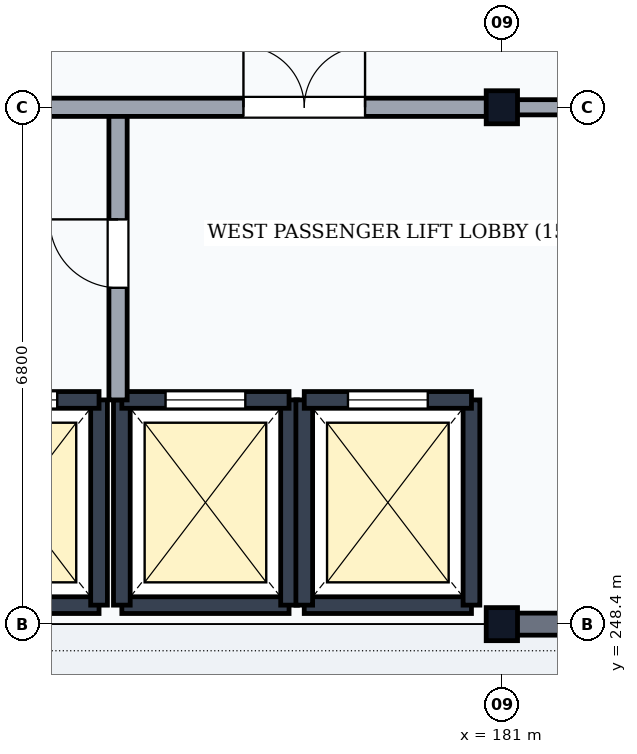
"""IFC4 building model, lengths in metres.
Left out: names, types, materials, properties, quantities, classifications, styles, units other than length and angle.
Written with IfcOpenShell. Run it as: python <this file> out.ifc"""

import sys

from ifc_helpers import new_model, si_unit, direction, frame, frame_2d, origin, origin_2d, place, context, subcontext, project, spatial, rectangle, i_section, extrude, element, fill, save


model = new_model("IFC4")
c1 = context("Model", 3, precision=1e-05, world=origin(), true_north=direction((0.0, 1.0)))
c2 = subcontext(c1, "Body", "Model", "MODEL_VIEW")
j1 = project(units=[si_unit("LENGTHUNIT", "METRE"), si_unit("PLANEANGLEUNIT", "RADIAN")], contexts=[c1])
p1 = place(None, origin())
s1 = spatial("IfcSite", under=j1, at=p1, CompositionType="ELEMENT")
p2 = place(p1, origin())
s2 = spatial("IfcBuilding", under=s1, at=p2, CompositionType="ELEMENT")
p3 = place(p2, frame((0.0, 0.0, 5.4)))
s3 = spatial("IfcBuildingStorey", under=s2, at=p3, CompositionType="ELEMENT", Elevation=5.4)
for number, where, z_axis, x_axis in (
    (1, (181.0, 248.4, 0.0), (0.0, 0.0, 1.0), (1.0, 0.0, 0.0)),
    (2, (181.0, 255.2, 0.0), (0.0, 0.0, 1.0), (1.0, 0.0, 0.0)),
):
    element("IfcColumn", number, at=place(p3, frame(where, z_axis=z_axis, x_axis=x_axis)), inside=s3, PredefinedType="COLUMN", context=c2, shape_type="SweptSolid", body=[
        extrude(i_section(OverallWidth=0.412, OverallDepth=0.435, WebThickness=0.036, FlangeThickness=0.057, FilletRadius=0.015, at=origin_2d()), origin(), (0.0, 0.0, 1.0), 5.1),
    ])
p4 = place(p3, frame((181.006, 248.4, 0.0), z_axis=(0.0, 0.0, 1.0), x_axis=(1.0, 0.0, 0.0)))
e3 = element("IfcWall", 3, at=p4, inside=s3, PredefinedType="SOLIDWALL", context=c2, shape_type="SweptSolid", body=[
    extrude(rectangle(XDim=7.988, YDim=0.29, at=frame_2d((3.994, 0.0))), origin(), (0.0, 0.0, 1.0), 4.548),
])
p5 = place(p4, frame((3.319, 0.0, 0.85)))
e4 = element("IfcOpeningElement", 4, at=p5, cuts=e3, PredefinedType="OPENING", context=c2, shape_type="SweptSolid", body=[
    extrude(rectangle(XDim=0.75, YDim=2.0, at=frame_2d((0.375, 1.0))), frame((0.0, 0.16, 0.0), z_axis=(0.0, -1.0, 0.0), x_axis=(1.0, 0.0, 0.0)), (0.0, 0.0, 1.0), 0.32),
])
p6 = place(p3, frame((173.5, 248.65, 0.0), z_axis=(0.0, 0.0, 1.0), x_axis=(1.0, 0.0, 0.0)))
e5 = element("IfcWall", 5, at=p6, inside=s3, PredefinedType="SHEAR", context=c2, shape_type="SweptSolid", body=[
    extrude(rectangle(XDim=2.2, YDim=0.22, at=frame_2d((1.1, 0.0))), origin(), (0.0, 0.0, 1.0), 4.86),
])
p7 = place(p3, frame((175.7, 248.65, 0.0), z_axis=(0.0, 0.0, 1.0), x_axis=(0.0, 1.0, 0.0)))
e6 = element("IfcWall", 6, at=p7, inside=s3, PredefinedType="SHEAR", context=c2, shape_type="SweptSolid", body=[
    extrude(rectangle(XDim=2.7, YDim=0.22, at=frame_2d((1.35, 0.0))), origin(), (0.0, 0.0, 1.0), 4.86),
])
p8 = place(p3, frame((173.5, 251.35, 0.0), z_axis=(0.0, 0.0, 1.0), x_axis=(1.0, 0.0, 0.0)))
e7 = element("IfcWall", 7, at=p8, inside=s3, PredefinedType="SHEAR", context=c2, shape_type="SweptSolid", body=[
    extrude(rectangle(XDim=2.2, YDim=0.22, at=frame_2d((1.1, 0.0))), origin(), (0.0, 0.0, 1.0), 4.86),
])
p9 = place(p8, frame((0.55, 0.0, 0.0)))
e8 = element("IfcOpeningElement", 8, at=p9, cuts=e7, PredefinedType="OPENING", context=c2, shape_type="SweptSolid", body=[
    extrude(rectangle(XDim=1.1, YDim=2.15, at=frame_2d((0.55, 1.075))), frame((0.0, 0.125, 0.0), z_axis=(0.0, -1.0, 0.0), x_axis=(1.0, 0.0, 0.0)), (0.0, 0.0, 1.0), 0.25),
])
p10 = place(p3, frame((176.0, 248.65, 0.0), z_axis=(0.0, 0.0, 1.0), x_axis=(1.0, 0.0, 0.0)))
e9 = element("IfcWall", 9, at=p10, inside=s3, PredefinedType="SHEAR", context=c2, shape_type="SweptSolid", body=[
    extrude(rectangle(XDim=2.2, YDim=0.22, at=frame_2d((1.1, 0.0))), origin(), (0.0, 0.0, 1.0), 4.86),
])
for number, where, z_axis, x_axis in (
    (10, (176.0, 248.65, 0.0), (0.0, 0.0, 1.0), (0.0, 1.0, 0.0)),
    (11, (178.2, 248.65, 0.0), (0.0, 0.0, 1.0), (0.0, 1.0, 0.0)),
):
    element("IfcWall", number, at=place(p3, frame(where, z_axis=z_axis, x_axis=x_axis)), inside=s3, PredefinedType="SHEAR", context=c2, shape_type="SweptSolid", body=[
        extrude(rectangle(XDim=2.7, YDim=0.22, at=frame_2d((1.35, 0.0))), origin(), (0.0, 0.0, 1.0), 4.86),
    ])
p11 = place(p3, frame((176.0, 251.35, 0.0), z_axis=(0.0, 0.0, 1.0), x_axis=(1.0, 0.0, 0.0)))
e12 = element("IfcWall", 12, at=p11, inside=s3, PredefinedType="SHEAR", context=c2, shape_type="SweptSolid", body=[
    extrude(rectangle(XDim=2.2, YDim=0.22, at=frame_2d((1.1, 0.0))), origin(), (0.0, 0.0, 1.0), 4.86),
])
p12 = place(p11, frame((0.575, 0.0, 0.0)))
e13 = element("IfcOpeningElement", 13, at=p12, cuts=e12, PredefinedType="OPENING", context=c2, shape_type="SweptSolid", body=[
    extrude(rectangle(XDim=1.05, YDim=2.15, at=frame_2d((0.525, 1.075))), frame((0.0, 0.125, 0.0), z_axis=(0.0, -1.0, 0.0), x_axis=(1.0, 0.0, 0.0)), (0.0, 0.0, 1.0), 0.25),
])
p13 = place(p3, frame((178.4, 248.65, 0.0), z_axis=(0.0, 0.0, 1.0), x_axis=(1.0, 0.0, 0.0)))
e14 = element("IfcWall", 14, at=p13, inside=s3, PredefinedType="SHEAR", context=c2, shape_type="SweptSolid", body=[
    extrude(rectangle(XDim=2.2, YDim=0.22, at=frame_2d((1.1, 0.0))), origin(), (0.0, 0.0, 1.0), 4.86),
])
for number, where, z_axis, x_axis in (
    (15, (178.4, 248.65, 0.0), (0.0, 0.0, 1.0), (0.0, 1.0, 0.0)),
    (16, (180.6, 248.65, 0.0), (0.0, 0.0, 1.0), (0.0, 1.0, 0.0)),
):
    element("IfcWall", number, at=place(p3, frame(where, z_axis=z_axis, x_axis=x_axis)), inside=s3, PredefinedType="SHEAR", context=c2, shape_type="SweptSolid", body=[
        extrude(rectangle(XDim=2.7, YDim=0.22, at=frame_2d((1.35, 0.0))), origin(), (0.0, 0.0, 1.0), 4.86),
    ])
p14 = place(p3, frame((178.4, 251.35, 0.0), z_axis=(0.0, 0.0, 1.0), x_axis=(1.0, 0.0, 0.0)))
e17 = element("IfcWall", 17, at=p14, inside=s3, PredefinedType="SHEAR", context=c2, shape_type="SweptSolid", body=[
    extrude(rectangle(XDim=2.2, YDim=0.22, at=frame_2d((1.1, 0.0))), origin(), (0.0, 0.0, 1.0), 4.86),
])
p15 = place(p14, frame((0.575, 0.0, 0.0)))
e18 = element("IfcOpeningElement", 18, at=p15, cuts=e17, PredefinedType="OPENING", context=c2, shape_type="SweptSolid", body=[
    extrude(rectangle(XDim=1.05, YDim=2.15, at=frame_2d((0.525, 1.075))), frame((0.0, 0.125, 0.0), z_axis=(0.0, -1.0, 0.0), x_axis=(1.0, 0.0, 0.0)), (0.0, 0.0, 1.0), 0.25),
])
p16 = place(p3, frame((175.95, 251.35, 0.0), z_axis=(0.0, 0.0, 1.0), x_axis=(0.0, 1.0, 0.0)))
e19 = element("IfcWall", 19, at=p16, inside=s3, PredefinedType="PARTITIONING", context=c2, shape_type="SweptSolid", body=[
    extrude(rectangle(XDim=3.85, YDim=0.24, at=frame_2d((1.925, 0.0))), origin(), (0.0, 0.0, 1.0), 4.86),
])
p17 = place(p16, frame((1.475, 0.0, 0.0)))
e20 = element("IfcOpeningElement", 20, at=p17, cuts=e19, PredefinedType="OPENING", context=c2, shape_type="SweptSolid", body=[
    extrude(rectangle(XDim=0.9, YDim=2.1, at=frame_2d((0.45, 1.05))), frame((0.0, 0.135, 0.0), z_axis=(0.0, -1.0, 0.0), x_axis=(1.0, 0.0, 0.0)), (0.0, 0.0, 1.0), 0.27),
])
p18 = place(p3, frame((173.0, 255.2, 0.0), z_axis=(0.0, 0.0, 1.0), x_axis=(1.0, 0.0, 0.0)))
e21 = element("IfcWall", 21, at=p18, inside=s3, PredefinedType="PARTITIONING", context=c2, shape_type="SweptSolid", body=[
    extrude(rectangle(XDim=8.0, YDim=0.24, at=frame_2d((4.0, 0.0))), origin(), (0.0, 0.0, 1.0), 4.358),
])
p19 = place(p18, frame((1.05, 0.0, 0.0)))
e22 = element("IfcOpeningElement", 22, at=p19, cuts=e21, PredefinedType="OPENING", context=c2, shape_type="SweptSolid", body=[
    extrude(rectangle(XDim=1.0, YDim=2.1, at=frame_2d((0.5, 1.05))), frame((0.0, 0.135, 0.0), z_axis=(0.0, -1.0, 0.0), x_axis=(1.0, 0.0, 0.0)), (0.0, 0.0, 1.0), 0.27),
])
p20 = place(p18, frame((4.6, 0.0, 0.0)))
e23 = element("IfcOpeningElement", 23, at=p20, cuts=e21, PredefinedType="OPENING", context=c2, shape_type="SweptSolid", body=[
    extrude(rectangle(XDim=1.6, YDim=2.25, at=frame_2d((0.8, 1.125))), frame((0.0, 0.135, 0.0), z_axis=(0.0, -1.0, 0.0), x_axis=(1.0, 0.0, 0.0)), (0.0, 0.0, 1.0), 0.27),
])
p21 = place(p3, frame((181.0, 255.2, 0.0), z_axis=(0.0, 0.0, 1.0), x_axis=(1.0, 0.0, 0.0)))
e24 = element("IfcWall", 24, at=p21, inside=s3, PredefinedType="PARTITIONING", context=c2, shape_type="SweptSolid", body=[
    extrude(rectangle(XDim=8.0, YDim=0.2, at=frame_2d((4.0, 0.0))), origin(), (0.0, 0.0, 1.0), 4.358),
])
p22 = place(p21, frame((0.85, 0.0, 0.0)))
e25 = element("IfcOpeningElement", 25, at=p22, cuts=e24, PredefinedType="OPENING", context=c2, shape_type="SweptSolid", body=[
    extrude(rectangle(XDim=0.9, YDim=2.1, at=frame_2d((0.45, 1.05))), frame((0.0, 0.115, 0.0), z_axis=(0.0, -1.0, 0.0), x_axis=(1.0, 0.0, 0.0)), (0.0, 0.0, 1.0), 0.23),
])
p23 = place(p21, frame((3.25, 0.0, 0.0)))
e26 = element("IfcOpeningElement", 26, at=p23, cuts=e24, PredefinedType="OPENING", context=c2, shape_type="SweptSolid", body=[
    extrude(rectangle(XDim=0.9, YDim=2.1, at=frame_2d((0.45, 1.05))), frame((0.0, 0.115, 0.0), z_axis=(0.0, -1.0, 0.0), x_axis=(1.0, 0.0, 0.0)), (0.0, 0.0, 1.0), 0.23),
])
p24 = place(p21, frame((5.075, 0.0, 0.0)))
e27 = element("IfcOpeningElement", 27, at=p24, cuts=e24, PredefinedType="OPENING", context=c2, shape_type="SweptSolid", body=[
    extrude(rectangle(XDim=0.95, YDim=2.1, at=frame_2d((0.475, 1.05))), frame((0.0, 0.115, 0.0), z_axis=(0.0, -1.0, 0.0), x_axis=(1.0, 0.0, 0.0)), (0.0, 0.0, 1.0), 0.23),
])
p25 = place(p21, frame((6.5, 0.0, 0.0)))
e28 = element("IfcOpeningElement", 28, at=p25, cuts=e24, PredefinedType="OPENING", context=c2, shape_type="SweptSolid", body=[
    extrude(rectangle(XDim=0.85, YDim=2.1, at=frame_2d((0.425, 1.05))), frame((0.0, 0.115, 0.0), z_axis=(0.0, -1.0, 0.0), x_axis=(1.0, 0.0, 0.0)), (0.0, 0.0, 1.0), 0.23),
])
p26 = place(p9, origin())
e29 = element("IfcDoor", 29, at=p26, inside=s3, OperationType="DOUBLE_DOOR_SLIDING", PredefinedType="USERDEFINED", context=c2, shape_type="SweptSolid", body=[
    extrude(rectangle(XDim=1.1, YDim=2.15, at=frame_2d((0.55, 1.075))), frame((0.0, 0.025, 0.0), z_axis=(0.0, -1.0, 0.0), x_axis=(1.0, 0.0, 0.0)), (0.0, 0.0, 1.0), 0.05),
])
fill(e8, e29)
p27 = place(p12, origin())
e30 = element("IfcDoor", 30, at=p27, inside=s3, OperationType="DOUBLE_DOOR_SLIDING", PredefinedType="USERDEFINED", context=c2, shape_type="SweptSolid", body=[
    extrude(rectangle(XDim=1.05, YDim=2.15, at=frame_2d((0.525, 1.075))), frame((0.0, 0.025, 0.0), z_axis=(0.0, -1.0, 0.0), x_axis=(1.0, 0.0, 0.0)), (0.0, 0.0, 1.0), 0.05),
])
fill(e13, e30)
p28 = place(p15, origin())
e31 = element("IfcDoor", 31, at=p28, inside=s3, OperationType="DOUBLE_DOOR_SLIDING", PredefinedType="USERDEFINED", context=c2, shape_type="SweptSolid", body=[
    extrude(rectangle(XDim=1.05, YDim=2.15, at=frame_2d((0.525, 1.075))), frame((0.0, 0.025, 0.0), z_axis=(0.0, -1.0, 0.0), x_axis=(1.0, 0.0, 0.0)), (0.0, 0.0, 1.0), 0.05),
])
fill(e18, e31)
p29 = place(p17, frame((0.9, 0.0, 0.0), z_axis=(0.0, 0.0, 1.0), x_axis=(-1.0, 0.0, 0.0)))
e32 = element("IfcDoor", 32, at=p29, inside=s3, OperationType="SINGLE_SWING_LEFT", PredefinedType="DOOR", context=c2, shape_type="SweptSolid", body=[
    extrude(rectangle(XDim=0.9, YDim=2.1, at=frame_2d((0.45, 1.05))), frame((0.0, 0.025, 0.0), z_axis=(0.0, -1.0, 0.0), x_axis=(1.0, 0.0, 0.0)), (0.0, 0.0, 1.0), 0.05),
])
fill(e20, e32)
p30 = place(p20, origin())
e33 = element("IfcDoor", 33, at=p30, inside=s3, OperationType="DOUBLE_DOOR_SINGLE_SWING", PredefinedType="DOOR", context=c2, shape_type="SweptSolid", body=[
    extrude(rectangle(XDim=1.6, YDim=2.25, at=frame_2d((0.8, 1.125))), frame((0.0, 0.025, 0.0), z_axis=(0.0, -1.0, 0.0), x_axis=(1.0, 0.0, 0.0)), (0.0, 0.0, 1.0), 0.05),
])
fill(e23, e33)
save(model, sys.argv[1])
